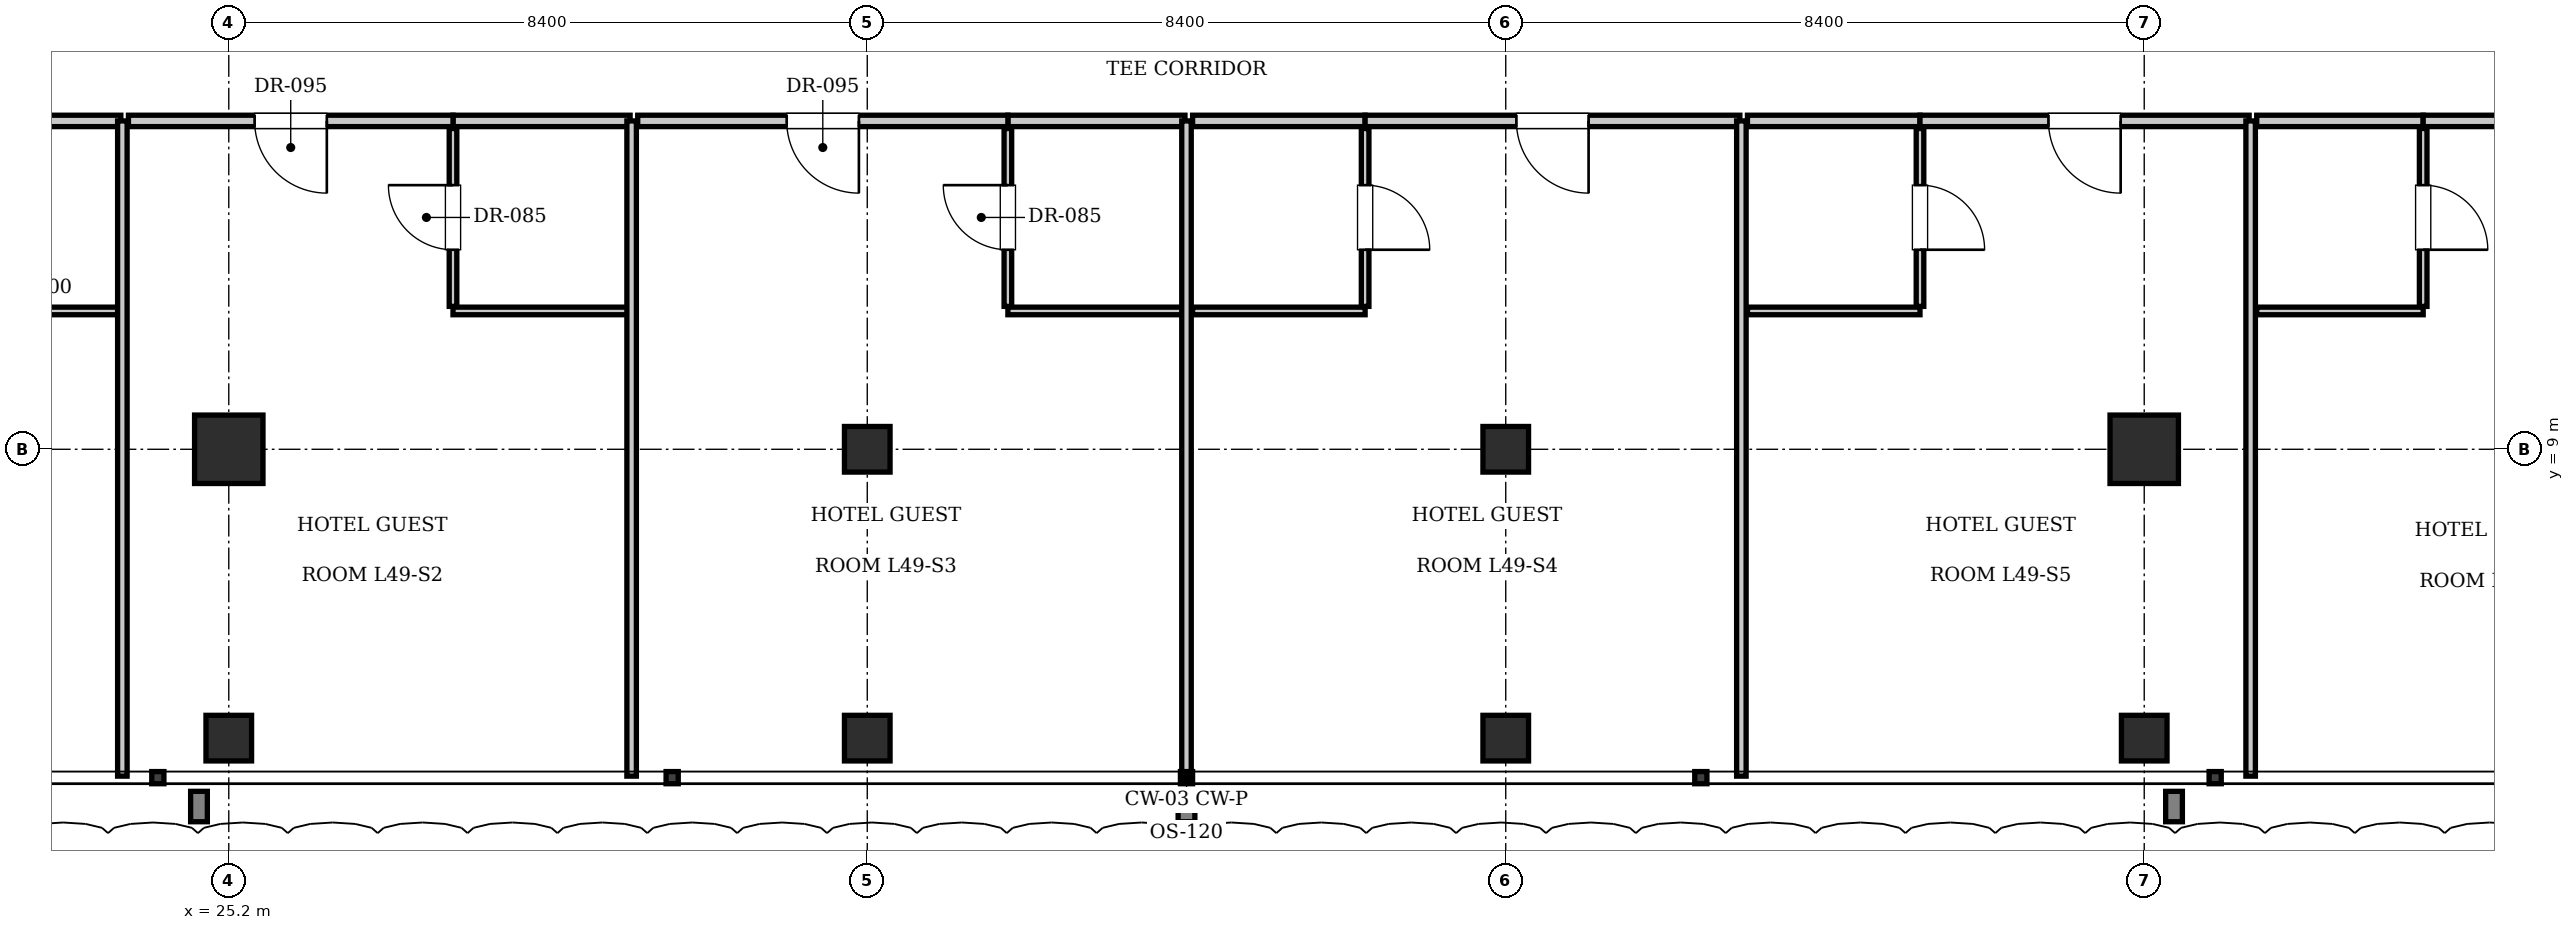
"""IFC4 building model, lengths in metres.
Left out: names, types, materials, properties, quantities, classifications, styles, units other than length and angle.
Written with IfcOpenShell. Run it as: python <this file> out.ifc"""

import sys

from ifc_helpers import new_model, si_unit, direction, frame, frame_2d, origin, origin_2d, place, context, subcontext, project, spatial, rectangle, i_section, extrude, element, fill, save


model = new_model("IFC4")
c1 = context("Model", 3, precision=1e-05, world=origin(), true_north=direction((0.0, 1.0)))
c2 = subcontext(c1, "Body", "Model", "MODEL_VIEW")
j1 = project(units=[si_unit("LENGTHUNIT", "METRE"), si_unit("PLANEANGLEUNIT", "RADIAN")], contexts=[c1])
p1 = place(None, origin())
s1 = spatial("IfcSite", under=j1, at=p1, CompositionType="ELEMENT")
p2 = place(p1, origin())
s2 = spatial("IfcBuilding", under=s1, at=p2, CompositionType="ELEMENT")
p3 = place(p2, frame((0.0, 0.0, 200.55)))
s3 = spatial("IfcBuildingStorey", under=s2, at=p3, CompositionType="ELEMENT", Elevation=200.55)
for number, where, z_axis, x_axis in (
    (1, (25.2, 9.0, 0.0), (0.0, 0.0, 1.0), (1.0, 0.0, 0.0)),
    (2, (50.4, 9.0, 0.0), (0.0, 0.0, 1.0), (1.0, 0.0, 0.0)),
):
    element("IfcColumn", number, at=place(p3, frame(where, z_axis=z_axis, x_axis=x_axis)), inside=s3, PredefinedType="COLUMN", context=c2, shape_type="SweptSolid", body=[
        extrude(rectangle(XDim=0.9, YDim=0.9, at=origin_2d()), origin(), (0.0, 0.0, 1.0), 3.85),
    ])
for number, where, z_axis, x_axis in (
    (3, (33.6, 9.0, 0.0), (0.0, 0.0, 1.0), (1.0, 0.0, 0.0)),
    (4, (42.0, 9.0, 0.0), (0.0, 0.0, 1.0), (1.0, 0.0, 0.0)),
    (5, (25.2, 5.2, 0.0), (0.0, 0.0, 1.0), (1.0, 0.0, 0.0)),
    (6, (33.6, 5.2, 0.0), (0.0, 0.0, 1.0), (1.0, 0.0, 0.0)),
    (7, (42.0, 5.2, 0.0), (0.0, 0.0, 1.0), (1.0, 0.0, 0.0)),
    (8, (50.4, 5.2, 0.0), (0.0, 0.0, 1.0), (1.0, 0.0, 0.0)),
):
    element("IfcColumn", number, at=place(p3, frame(where, z_axis=z_axis, x_axis=x_axis)), inside=s3, PredefinedType="COLUMN", context=c2, shape_type="SweptSolid", body=[
        extrude(i_section(OverallWidth=0.6, OverallDepth=0.6, WebThickness=0.025, FlangeThickness=0.038, at=origin_2d()), origin(), (0.0, 0.0, 1.0), 3.85),
    ])
p4 = place(p3, frame((21.53, 13.32, 0.0), z_axis=(0.0, 0.0, 1.0), x_axis=(1.0, 0.0, 0.0)))
e9 = element("IfcWall", 9, at=p4, inside=s3, PredefinedType="PARTITIONING", context=c2, shape_type="SweptSolid", body=[
    extrude(rectangle(XDim=2.25, YDim=0.15, at=frame_2d((1.125, 0.0))), origin(), (0.0, 0.0, 1.0), 3.61),
])
p5 = place(p3, frame((21.53, 10.82, 0.0), z_axis=(0.0, 0.0, 1.0), x_axis=(1.0, 0.0, 0.0)))
e10 = element("IfcWall", 10, at=p5, inside=s3, PredefinedType="PARTITIONING", context=c2, shape_type="SweptSolid", body=[
    extrude(rectangle(XDim=2.23, YDim=0.1, at=frame_2d((1.115, 0.0))), origin(), (0.0, 0.0, 1.0), 3.61),
])
p6 = place(p3, frame((23.8, 4.7, 0.0), z_axis=(0.0, 0.0, 1.0), x_axis=(0.0, 1.0, 0.0)))
e11 = element("IfcWall", 11, at=p6, inside=s3, PredefinedType="PARTITIONING", context=c2, shape_type="SweptSolid", body=[
    extrude(rectangle(XDim=8.62, YDim=0.125, at=frame_2d((4.31, 0.0))), origin(), (0.0, 0.0, 1.0), 3.61),
])
p7 = place(p3, frame((28.15, 13.32, 0.0), z_axis=(0.0, 0.0, 1.0), x_axis=(1.0, 0.0, 0.0)))
e12 = element("IfcWall", 12, at=p7, inside=s3, PredefinedType="PARTITIONING", context=c2, shape_type="SweptSolid", body=[
    extrude(rectangle(XDim=2.33, YDim=0.15, at=frame_2d((1.165, 0.0))), origin(), (0.0, 0.0, 1.0), 3.61),
])
p8 = place(p3, frame((28.15, 10.82, 0.0), z_axis=(0.0, 0.0, 1.0), x_axis=(1.0, 0.0, 0.0)))
e13 = element("IfcWall", 13, at=p8, inside=s3, PredefinedType="PARTITIONING", context=c2, shape_type="SweptSolid", body=[
    extrude(rectangle(XDim=2.31, YDim=0.1, at=frame_2d((1.155, 0.0))), origin(), (0.0, 0.0, 1.0), 3.61),
])
p9 = place(p3, frame((28.15, 10.88, 0.0), z_axis=(0.0, 0.0, 1.0), x_axis=(0.0, 1.0, 0.0)))
e14 = element("IfcWall", 14, at=p9, inside=s3, PredefinedType="PARTITIONING", context=c2, shape_type="SweptSolid", body=[
    extrude(rectangle(XDim=2.34, YDim=0.1, at=frame_2d((1.17, 0.0))), origin(), (0.0, 0.0, 1.0), 3.61),
])
p10 = place(p9, frame((0.745, 0.0, 0.0)))
e15 = element("IfcOpeningElement", 15, at=p10, cuts=e14, PredefinedType="OPENING", context=c2, shape_type="SweptSolid", body=[
    extrude(rectangle(XDim=0.85, YDim=2.1, at=frame_2d((0.425, 1.05))), frame((0.0, 0.06, 0.0), z_axis=(0.0, -1.0, 0.0), x_axis=(1.0, 0.0, 0.0)), (0.0, 0.0, 1.0), 0.12),
])
p11 = place(p3, frame((23.88, 13.32, 0.0), z_axis=(0.0, 0.0, 1.0), x_axis=(1.0, 0.0, 0.0)))
e16 = element("IfcWall", 16, at=p11, inside=s3, PredefinedType="PARTITIONING", context=c2, shape_type="SweptSolid", body=[
    extrude(rectangle(XDim=4.27, YDim=0.15, at=frame_2d((2.135, 0.0))), origin(), (0.0, 0.0, 1.0), 3.61),
])
p12 = place(p11, frame((1.66, 0.0, 0.0)))
e17 = element("IfcOpeningElement", 17, at=p12, cuts=e16, PredefinedType="OPENING", context=c2, shape_type="SweptSolid", body=[
    extrude(rectangle(XDim=0.95, YDim=2.15, at=frame_2d((0.475, 1.075))), frame((0.0, 0.085, 0.0), z_axis=(0.0, -1.0, 0.0), x_axis=(1.0, 0.0, 0.0)), (0.0, 0.0, 1.0), 0.17),
])
p13 = place(p3, frame((30.5, 4.7, 0.0), z_axis=(0.0, 0.0, 1.0), x_axis=(0.0, 1.0, 0.0)))
e18 = element("IfcWall", 18, at=p13, inside=s3, PredefinedType="PARTITIONING", context=c2, shape_type="SweptSolid", body=[
    extrude(rectangle(XDim=8.62, YDim=0.125, at=frame_2d((4.31, 0.0))), origin(), (0.0, 0.0, 1.0), 3.61),
])
p14 = place(p3, frame((35.45, 13.32, 0.0), z_axis=(0.0, 0.0, 1.0), x_axis=(1.0, 0.0, 0.0)))
e19 = element("IfcWall", 19, at=p14, inside=s3, PredefinedType="PARTITIONING", context=c2, shape_type="SweptSolid", body=[
    extrude(rectangle(XDim=2.33, YDim=0.15, at=frame_2d((1.165, 0.0))), origin(), (0.0, 0.0, 1.0), 3.61),
])
p15 = place(p3, frame((35.45, 10.82, 0.0), z_axis=(0.0, 0.0, 1.0), x_axis=(1.0, 0.0, 0.0)))
e20 = element("IfcWall", 20, at=p15, inside=s3, PredefinedType="PARTITIONING", context=c2, shape_type="SweptSolid", body=[
    extrude(rectangle(XDim=2.31, YDim=0.1, at=frame_2d((1.155, 0.0))), origin(), (0.0, 0.0, 1.0), 3.61),
])
p16 = place(p3, frame((35.45, 10.88, 0.0), z_axis=(0.0, 0.0, 1.0), x_axis=(0.0, 1.0, 0.0)))
e21 = element("IfcWall", 21, at=p16, inside=s3, PredefinedType="PARTITIONING", context=c2, shape_type="SweptSolid", body=[
    extrude(rectangle(XDim=2.34, YDim=0.1, at=frame_2d((1.17, 0.0))), origin(), (0.0, 0.0, 1.0), 3.61),
])
p17 = place(p16, frame((0.745, 0.0, 0.0)))
e22 = element("IfcOpeningElement", 22, at=p17, cuts=e21, PredefinedType="OPENING", context=c2, shape_type="SweptSolid", body=[
    extrude(rectangle(XDim=0.85, YDim=2.1, at=frame_2d((0.425, 1.05))), frame((0.0, 0.06, 0.0), z_axis=(0.0, -1.0, 0.0), x_axis=(1.0, 0.0, 0.0)), (0.0, 0.0, 1.0), 0.12),
])
p18 = place(p3, frame((30.58, 13.32, 0.0), z_axis=(0.0, 0.0, 1.0), x_axis=(1.0, 0.0, 0.0)))
e23 = element("IfcWall", 23, at=p18, inside=s3, PredefinedType="PARTITIONING", context=c2, shape_type="SweptSolid", body=[
    extrude(rectangle(XDim=4.87, YDim=0.15, at=frame_2d((2.435, 0.0))), origin(), (0.0, 0.0, 1.0), 3.61),
])
p19 = place(p18, frame((1.96, 0.0, 0.0)))
e24 = element("IfcOpeningElement", 24, at=p19, cuts=e23, PredefinedType="OPENING", context=c2, shape_type="SweptSolid", body=[
    extrude(rectangle(XDim=0.95, YDim=2.15, at=frame_2d((0.475, 1.075))), frame((0.0, 0.085, 0.0), z_axis=(0.0, -1.0, 0.0), x_axis=(1.0, 0.0, 0.0)), (0.0, 0.0, 1.0), 0.17),
])
p20 = place(p3, frame((37.8, 4.7, 0.0), z_axis=(0.0, 0.0, 1.0), x_axis=(0.0, 1.0, 0.0)))
e25 = element("IfcWall", 25, at=p20, inside=s3, PredefinedType="PARTITIONING", context=c2, shape_type="SweptSolid", body=[
    extrude(rectangle(XDim=8.62, YDim=0.125, at=frame_2d((4.31, 0.0))), origin(), (0.0, 0.0, 1.0), 3.352),
])
p21 = place(p3, frame((37.88, 13.32, 0.0), z_axis=(0.0, 0.0, 1.0), x_axis=(1.0, 0.0, 0.0)))
e26 = element("IfcWall", 26, at=p21, inside=s3, PredefinedType="PARTITIONING", context=c2, shape_type="SweptSolid", body=[
    extrude(rectangle(XDim=2.27, YDim=0.15, at=frame_2d((1.135, 0.0))), origin(), (0.0, 0.0, 1.0), 3.61),
])
p22 = place(p3, frame((37.88, 10.82, 0.0), z_axis=(0.0, 0.0, 1.0), x_axis=(1.0, 0.0, 0.0)))
e27 = element("IfcWall", 27, at=p22, inside=s3, PredefinedType="PARTITIONING", context=c2, shape_type="SweptSolid", body=[
    extrude(rectangle(XDim=2.27, YDim=0.1, at=frame_2d((1.135, 0.0))), origin(), (0.0, 0.0, 1.0), 3.61),
])
p23 = place(p3, frame((40.15, 10.88, 0.0), z_axis=(0.0, 0.0, 1.0), x_axis=(0.0, 1.0, 0.0)))
e28 = element("IfcWall", 28, at=p23, inside=s3, PredefinedType="PARTITIONING", context=c2, shape_type="SweptSolid", body=[
    extrude(rectangle(XDim=2.34, YDim=0.1, at=frame_2d((1.17, 0.0))), origin(), (0.0, 0.0, 1.0), 3.61),
])
p24 = place(p23, frame((0.745, 0.0, 0.0)))
e29 = element("IfcOpeningElement", 29, at=p24, cuts=e28, PredefinedType="OPENING", context=c2, shape_type="SweptSolid", body=[
    extrude(rectangle(XDim=0.85, YDim=2.1, at=frame_2d((0.425, 1.05))), frame((0.0, 0.06, 0.0), z_axis=(0.0, -1.0, 0.0), x_axis=(1.0, 0.0, 0.0)), (0.0, 0.0, 1.0), 0.12),
])
p25 = place(p3, frame((40.15, 13.32, 0.0), z_axis=(0.0, 0.0, 1.0), x_axis=(1.0, 0.0, 0.0)))
e30 = element("IfcWall", 30, at=p25, inside=s3, PredefinedType="PARTITIONING", context=c2, shape_type="SweptSolid", body=[
    extrude(rectangle(XDim=4.93, YDim=0.15, at=frame_2d((2.465, 0.0))), origin(), (0.0, 0.0, 1.0), 3.61),
])
p26 = place(p25, frame((1.99, 0.0, 0.0)))
e31 = element("IfcOpeningElement", 31, at=p26, cuts=e30, PredefinedType="OPENING", context=c2, shape_type="SweptSolid", body=[
    extrude(rectangle(XDim=0.95, YDim=2.15, at=frame_2d((0.475, 1.075))), frame((0.0, 0.085, 0.0), z_axis=(0.0, -1.0, 0.0), x_axis=(1.0, 0.0, 0.0)), (0.0, 0.0, 1.0), 0.17),
])
p27 = place(p3, frame((45.1, 4.7, 0.0), z_axis=(0.0, 0.0, 1.0), x_axis=(0.0, 1.0, 0.0)))
e32 = element("IfcWall", 32, at=p27, inside=s3, PredefinedType="PARTITIONING", context=c2, shape_type="SweptSolid", body=[
    extrude(rectangle(XDim=8.62, YDim=0.125, at=frame_2d((4.31, 0.0))), origin(), (0.0, 0.0, 1.0), 3.61),
])
p28 = place(p3, frame((45.18, 13.32, 0.0), z_axis=(0.0, 0.0, 1.0), x_axis=(1.0, 0.0, 0.0)))
e33 = element("IfcWall", 33, at=p28, inside=s3, PredefinedType="PARTITIONING", context=c2, shape_type="SweptSolid", body=[
    extrude(rectangle(XDim=2.27, YDim=0.15, at=frame_2d((1.135, 0.0))), origin(), (0.0, 0.0, 1.0), 3.61),
])
p29 = place(p3, frame((45.18, 10.82, 0.0), z_axis=(0.0, 0.0, 1.0), x_axis=(1.0, 0.0, 0.0)))
e34 = element("IfcWall", 34, at=p29, inside=s3, PredefinedType="PARTITIONING", context=c2, shape_type="SweptSolid", body=[
    extrude(rectangle(XDim=2.27, YDim=0.1, at=frame_2d((1.135, 0.0))), origin(), (0.0, 0.0, 1.0), 3.61),
])
p30 = place(p3, frame((47.45, 10.88, 0.0), z_axis=(0.0, 0.0, 1.0), x_axis=(0.0, 1.0, 0.0)))
e35 = element("IfcWall", 35, at=p30, inside=s3, PredefinedType="PARTITIONING", context=c2, shape_type="SweptSolid", body=[
    extrude(rectangle(XDim=2.34, YDim=0.1, at=frame_2d((1.17, 0.0))), origin(), (0.0, 0.0, 1.0), 3.61),
])
p31 = place(p30, frame((0.745, 0.0, 0.0)))
e36 = element("IfcOpeningElement", 36, at=p31, cuts=e35, PredefinedType="OPENING", context=c2, shape_type="SweptSolid", body=[
    extrude(rectangle(XDim=0.85, YDim=2.1, at=frame_2d((0.425, 1.05))), frame((0.0, 0.06, 0.0), z_axis=(0.0, -1.0, 0.0), x_axis=(1.0, 0.0, 0.0)), (0.0, 0.0, 1.0), 0.12),
])
p32 = place(p3, frame((47.45, 13.32, 0.0), z_axis=(0.0, 0.0, 1.0), x_axis=(1.0, 0.0, 0.0)))
e37 = element("IfcWall", 37, at=p32, inside=s3, PredefinedType="PARTITIONING", context=c2, shape_type="SweptSolid", body=[
    extrude(rectangle(XDim=4.33, YDim=0.15, at=frame_2d((2.165, 0.0))), origin(), (0.0, 0.0, 1.0), 3.61),
])
p33 = place(p32, frame((1.69, 0.0, 0.0)))
e38 = element("IfcOpeningElement", 38, at=p33, cuts=e37, PredefinedType="OPENING", context=c2, shape_type="SweptSolid", body=[
    extrude(rectangle(XDim=0.95, YDim=2.15, at=frame_2d((0.475, 1.075))), frame((0.0, 0.085, 0.0), z_axis=(0.0, -1.0, 0.0), x_axis=(1.0, 0.0, 0.0)), (0.0, 0.0, 1.0), 0.17),
])
p34 = place(p3, frame((51.8, 4.7, 0.0), z_axis=(0.0, 0.0, 1.0), x_axis=(0.0, 1.0, 0.0)))
e39 = element("IfcWall", 39, at=p34, inside=s3, PredefinedType="PARTITIONING", context=c2, shape_type="SweptSolid", body=[
    extrude(rectangle(XDim=8.62, YDim=0.125, at=frame_2d((4.31, 0.0))), origin(), (0.0, 0.0, 1.0), 3.61),
])
p35 = place(p3, frame((51.88, 13.32, 0.0), z_axis=(0.0, 0.0, 1.0), x_axis=(1.0, 0.0, 0.0)))
e40 = element("IfcWall", 40, at=p35, inside=s3, PredefinedType="PARTITIONING", context=c2, shape_type="SweptSolid", body=[
    extrude(rectangle(XDim=2.19, YDim=0.15, at=frame_2d((1.095, 0.0))), origin(), (0.0, 0.0, 1.0), 3.61),
])
p36 = place(p3, frame((51.88, 10.82, 0.0), z_axis=(0.0, 0.0, 1.0), x_axis=(1.0, 0.0, 0.0)))
e41 = element("IfcWall", 41, at=p36, inside=s3, PredefinedType="PARTITIONING", context=c2, shape_type="SweptSolid", body=[
    extrude(rectangle(XDim=2.19, YDim=0.1, at=frame_2d((1.095, 0.0))), origin(), (0.0, 0.0, 1.0), 3.61),
])
p37 = place(p3, frame((54.07, 10.88, 0.0), z_axis=(0.0, 0.0, 1.0), x_axis=(0.0, 1.0, 0.0)))
e42 = element("IfcWall", 42, at=p37, inside=s3, PredefinedType="PARTITIONING", context=c2, shape_type="SweptSolid", body=[
    extrude(rectangle(XDim=2.34, YDim=0.1, at=frame_2d((1.17, 0.0))), origin(), (0.0, 0.0, 1.0), 3.61),
])
p38 = place(p37, frame((0.745, 0.0, 0.0)))
e43 = element("IfcOpeningElement", 43, at=p38, cuts=e42, PredefinedType="OPENING", context=c2, shape_type="SweptSolid", body=[
    extrude(rectangle(XDim=0.85, YDim=2.1, at=frame_2d((0.425, 1.05))), frame((0.0, 0.06, 0.0), z_axis=(0.0, -1.0, 0.0), x_axis=(1.0, 0.0, 0.0)), (0.0, 0.0, 1.0), 0.12),
])
p39 = place(p3, frame((54.07, 13.32, 0.0), z_axis=(0.0, 0.0, 1.0), x_axis=(1.0, 0.0, 0.0)))
e44 = element("IfcWall", 44, at=p39, inside=s3, PredefinedType="PARTITIONING", context=c2, shape_type="SweptSolid", body=[
    extrude(rectangle(XDim=4.01, YDim=0.15, at=frame_2d((2.005, 0.0))), origin(), (0.0, 0.0, 1.0), 3.61),
])
p40 = place(p39, frame((1.53, 0.0, 0.0)))
e45 = element("IfcOpeningElement", 45, at=p40, cuts=e44, PredefinedType="OPENING", context=c2, shape_type="SweptSolid", body=[
    extrude(rectangle(XDim=0.95, YDim=2.15, at=frame_2d((0.475, 1.075))), frame((0.0, 0.085, 0.0), z_axis=(0.0, -1.0, 0.0), x_axis=(1.0, 0.0, 0.0)), (0.0, 0.0, 1.0), 0.17),
])
p41 = place(p10, origin())
e46 = element("IfcDoor", 46, at=p41, inside=s3, OperationType="SINGLE_SWING_RIGHT", PredefinedType="DOOR", context=c2, shape_type="SweptSolid", body=[
    extrude(rectangle(XDim=0.85, YDim=2.1, at=frame_2d((0.425, 1.05))), frame((0.0, 0.025, 0.0), z_axis=(0.0, -1.0, 0.0), x_axis=(1.0, 0.0, 0.0)), (0.0, 0.0, 1.0), 0.05),
])
fill(e15, e46)
p42 = place(p12, frame((0.95, 0.0, 0.0), z_axis=(0.0, 0.0, 1.0), x_axis=(-1.0, 0.0, 0.0)))
e47 = element("IfcDoor", 47, at=p42, inside=s3, OperationType="SINGLE_SWING_LEFT", PredefinedType="DOOR", context=c2, shape_type="SweptSolid", body=[
    extrude(rectangle(XDim=0.95, YDim=2.15, at=frame_2d((0.475, 1.075))), frame((0.0, 0.025, 0.0), z_axis=(0.0, -1.0, 0.0), x_axis=(1.0, 0.0, 0.0)), (0.0, 0.0, 1.0), 0.05),
])
fill(e17, e47)
p43 = place(p17, origin())
e48 = element("IfcDoor", 48, at=p43, inside=s3, OperationType="SINGLE_SWING_RIGHT", PredefinedType="DOOR", context=c2, shape_type="SweptSolid", body=[
    extrude(rectangle(XDim=0.85, YDim=2.1, at=frame_2d((0.425, 1.05))), frame((0.0, 0.025, 0.0), z_axis=(0.0, -1.0, 0.0), x_axis=(1.0, 0.0, 0.0)), (0.0, 0.0, 1.0), 0.05),
])
fill(e22, e48)
p44 = place(p19, frame((0.95, 0.0, 0.0), z_axis=(0.0, 0.0, 1.0), x_axis=(-1.0, 0.0, 0.0)))
e49 = element("IfcDoor", 49, at=p44, inside=s3, OperationType="SINGLE_SWING_LEFT", PredefinedType="DOOR", context=c2, shape_type="SweptSolid", body=[
    extrude(rectangle(XDim=0.95, YDim=2.15, at=frame_2d((0.475, 1.075))), frame((0.0, 0.025, 0.0), z_axis=(0.0, -1.0, 0.0), x_axis=(1.0, 0.0, 0.0)), (0.0, 0.0, 1.0), 0.05),
])
fill(e24, e49)
p45 = place(p24, frame((0.85, 0.0, 0.0), z_axis=(0.0, 0.0, 1.0), x_axis=(-1.0, 0.0, 0.0)))
e50 = element("IfcDoor", 50, at=p45, inside=s3, OperationType="SINGLE_SWING_RIGHT", PredefinedType="DOOR", context=c2, shape_type="SweptSolid", body=[
    extrude(rectangle(XDim=0.85, YDim=2.1, at=frame_2d((0.425, 1.05))), frame((0.0, 0.025, 0.0), z_axis=(0.0, -1.0, 0.0), x_axis=(1.0, 0.0, 0.0)), (0.0, 0.0, 1.0), 0.05),
])
fill(e29, e50)
p46 = place(p26, frame((0.95, 0.0, 0.0), z_axis=(0.0, 0.0, 1.0), x_axis=(-1.0, 0.0, 0.0)))
e51 = element("IfcDoor", 51, at=p46, inside=s3, OperationType="SINGLE_SWING_LEFT", PredefinedType="DOOR", context=c2, shape_type="SweptSolid", body=[
    extrude(rectangle(XDim=0.95, YDim=2.15, at=frame_2d((0.475, 1.075))), frame((0.0, 0.025, 0.0), z_axis=(0.0, -1.0, 0.0), x_axis=(1.0, 0.0, 0.0)), (0.0, 0.0, 1.0), 0.05),
])
fill(e31, e51)
p47 = place(p31, frame((0.85, 0.0, 0.0), z_axis=(0.0, 0.0, 1.0), x_axis=(-1.0, 0.0, 0.0)))
e52 = element("IfcDoor", 52, at=p47, inside=s3, OperationType="SINGLE_SWING_RIGHT", PredefinedType="DOOR", context=c2, shape_type="SweptSolid", body=[
    extrude(rectangle(XDim=0.85, YDim=2.1, at=frame_2d((0.425, 1.05))), frame((0.0, 0.025, 0.0), z_axis=(0.0, -1.0, 0.0), x_axis=(1.0, 0.0, 0.0)), (0.0, 0.0, 1.0), 0.05),
])
fill(e36, e52)
p48 = place(p33, frame((0.95, 0.0, 0.0), z_axis=(0.0, 0.0, 1.0), x_axis=(-1.0, 0.0, 0.0)))
e53 = element("IfcDoor", 53, at=p48, inside=s3, OperationType="SINGLE_SWING_LEFT", PredefinedType="DOOR", context=c2, shape_type="SweptSolid", body=[
    extrude(rectangle(XDim=0.95, YDim=2.15, at=frame_2d((0.475, 1.075))), frame((0.0, 0.025, 0.0), z_axis=(0.0, -1.0, 0.0), x_axis=(1.0, 0.0, 0.0)), (0.0, 0.0, 1.0), 0.05),
])
fill(e38, e53)
p49 = place(p38, frame((0.85, 0.0, 0.0), z_axis=(0.0, 0.0, 1.0), x_axis=(-1.0, 0.0, 0.0)))
e54 = element("IfcDoor", 54, at=p49, inside=s3, OperationType="SINGLE_SWING_RIGHT", PredefinedType="DOOR", context=c2, shape_type="SweptSolid", body=[
    extrude(rectangle(XDim=0.85, YDim=2.1, at=frame_2d((0.425, 1.05))), frame((0.0, 0.025, 0.0), z_axis=(0.0, -1.0, 0.0), x_axis=(1.0, 0.0, 0.0)), (0.0, 0.0, 1.0), 0.05),
])
fill(e43, e54)
save(model, sys.argv[1])
